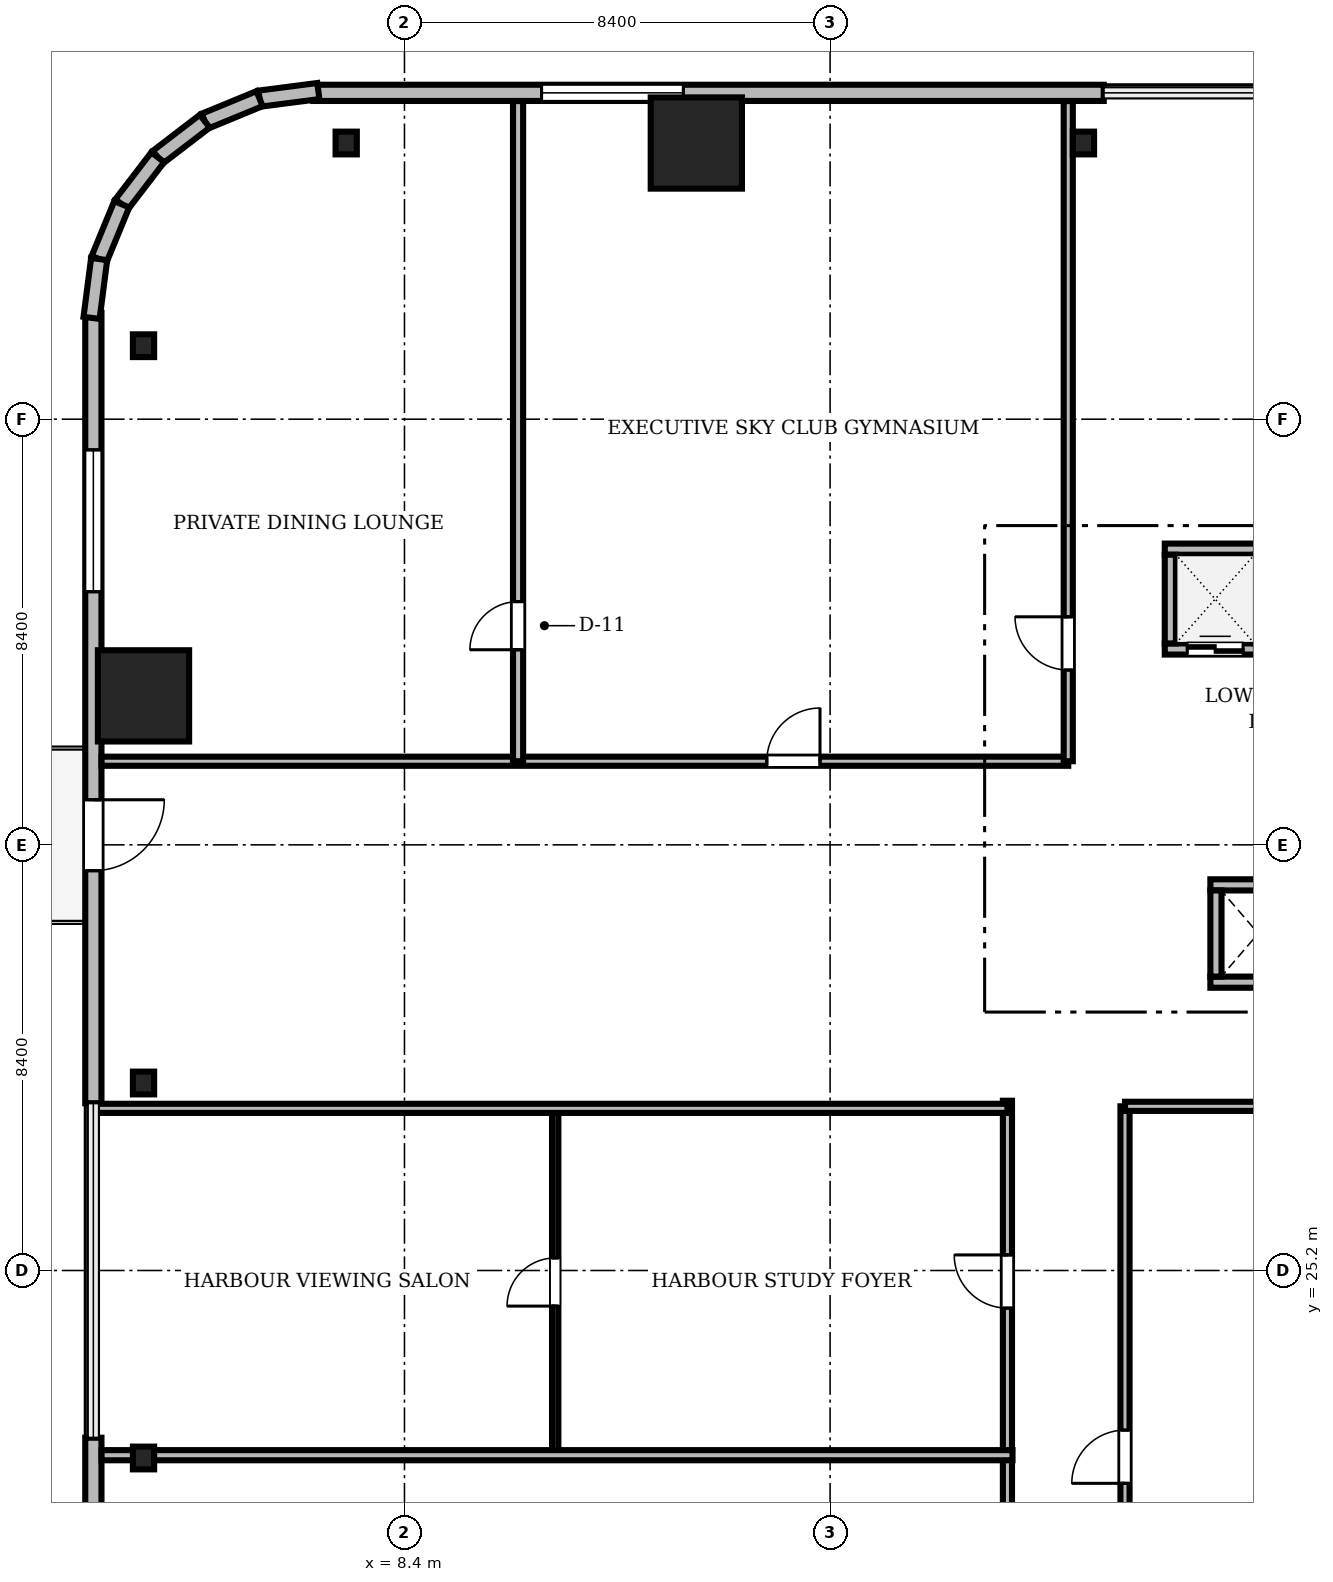
"""IFC4 building model, lengths in metres.
Left out: names, types, materials, properties, quantities, classifications, styles, units other than length and angle.
Written with IfcOpenShell. Run it as: python <this file> out.ifc"""

import sys

from ifc_helpers import new_model, si_unit, direction, frame, frame_2d, origin, origin_2d, place, context, subcontext, project, spatial, rectangle, i_section, extrude, source, transform, mapped, element, fill, save


model = new_model("IFC4")
c1 = context("Model", 3, precision=1e-05, world=origin(), true_north=direction((0.0, 1.0)))
c2 = subcontext(c1, "Body", "Model", "MODEL_VIEW")
j1 = project(units=[si_unit("LENGTHUNIT", "METRE"), si_unit("PLANEANGLEUNIT", "RADIAN")], contexts=[c1])
p1 = place(None, origin())
s1 = spatial("IfcSite", under=j1, at=p1, CompositionType="ELEMENT")
p2 = place(p1, origin())
s2 = spatial("IfcBuilding", under=s1, at=p2, CompositionType="ELEMENT")
p3 = place(p2, frame((0.0, 0.0, 71.4)))
s3 = spatial("IfcBuildingStorey", under=s2, at=p3, CompositionType="ELEMENT", Elevation=71.4)
m1 = source(origin(), c2, "Body", "SweptSolid", [
    extrude(rectangle(XDim=1.8, YDim=1.8, at=origin_2d()), origin(), (0.0, 0.0, 1.0), 3.41),
])
for number, where, z_axis, x_axis in (
    (1, (14.16, 47.45, 0.0), (0.0, 0.0, 1.0), (1.0, 0.0, 0.0)),
    (2, (3.25, 36.54, 0.0), (0.0, 0.0, 1.0), (1.0, 0.0, 0.0)),
):
    element("IfcColumn", number, at=place(p3, frame(where, z_axis=z_axis, x_axis=x_axis)), inside=s3, PredefinedType="COLUMN", context=c2, shape_type="MappedRepresentation", body=[
        mapped(m1, transform((0.0, 0.0, 0.0), scale=1.0)),
    ])
m2 = source(origin(), c2, "Body", "SweptSolid", [
    extrude(i_section(OverallWidth=0.419, OverallDepth=0.449, WebThickness=0.031, FlangeThickness=0.048, FilletRadius=0.015, at=origin_2d()), origin(), (0.0, 0.0, 1.0), 3.41),
])
for number, where, z_axis, x_axis in (
    (3, (21.8, 47.45, 0.0), (0.0, 0.0, 1.0), (1.0, 0.0, 0.0)),
    (4, (7.25, 47.45, 0.0), (0.0, 0.0, 1.0), (1.0, 0.0, 0.0)),
    (5, (3.25, 43.45, 0.0), (0.0, 0.0, 1.0), (1.0, 0.0, 0.0)),
    (6, (3.25, 28.9, 0.0), (0.0, 0.0, 1.0), (1.0, 0.0, 0.0)),
    (7, (3.25, 21.5, 0.0), (0.0, 0.0, 1.0), (1.0, 0.0, 0.0)),
):
    element("IfcColumn", number, at=place(p3, frame(where, z_axis=z_axis, x_axis=x_axis)), inside=s3, PredefinedType="COLUMN", context=c2, shape_type="MappedRepresentation", body=[
        mapped(m2, transform((0.0, 0.0, 0.0), scale=1.0)),
    ])
m3 = source(origin(), c2, "Body", "SweptSolid", [
    extrude(rectangle(XDim=15.6, YDim=0.32, at=frame_2d((7.8, 0.0))), origin(), (0.0, 0.0, 1.0), 3.41),
])
p4 = place(p3, frame((22.2, 48.44, 0.0), z_axis=(0.0, 0.0, 1.0), x_axis=(-1.0, 0.0, 0.0)))
e8 = element("IfcWall", 8, at=p4, inside=s3, PredefinedType="SOLIDWALL", context=c2, shape_type="MappedRepresentation", body=[
    mapped(m3, transform((0.0, 0.0, 0.0), scale=1.0)),
])
m4 = source(origin(), c2, "Body", "SweptSolid", [
    extrude(rectangle(XDim=2.8, YDim=2.4, at=frame_2d((1.4, 1.2))), frame((0.0, 0.17, 0.0), z_axis=(0.0, -1.0, 0.0), x_axis=(1.0, 0.0, 0.0)), (0.0, 0.0, 1.0), 0.34),
])
p5 = place(p4, frame((8.295, 0.0, 0.72)))
e9 = element("IfcOpeningElement", 9, at=p5, cuts=e8, PredefinedType="OPENING", context=c2, shape_type="MappedRepresentation", body=[
    mapped(m4, transform((0.0, 0.0, 0.0), scale=1.0)),
])
m5 = source(origin(), c2, "Body", "SweptSolid", [
    extrude(rectangle(XDim=15.6, YDim=0.32, at=frame_2d((7.8, 0.0))), origin(), (0.0, 0.0, 1.0), 3.41),
])
p6 = place(p3, frame((2.26, 44.1, 0.0), z_axis=(0.0, 0.0, 1.0), x_axis=(0.0, -1.0, 0.0)))
e10 = element("IfcWall", 10, at=p6, inside=s3, PredefinedType="SOLIDWALL", context=c2, shape_type="MappedRepresentation", body=[
    mapped(m5, transform((0.0, 0.0, 0.0), scale=1.0)),
])
m6 = source(origin(), c2, "Body", "SweptSolid", [
    extrude(rectangle(XDim=1.4, YDim=2.3, at=frame_2d((0.7, 1.15))), frame((0.0, 0.17, 0.0), z_axis=(0.0, -1.0, 0.0), x_axis=(1.0, 0.0, 0.0)), (0.0, 0.0, 1.0), 0.34),
])
p7 = place(p6, frame((9.61, 0.0, 0.0)))
e11 = element("IfcOpeningElement", 11, at=p7, cuts=e10, PredefinedType="OPENING", context=c2, shape_type="MappedRepresentation", body=[
    mapped(m6, transform((0.0, 0.0, 0.0), scale=1.0)),
])
p8 = place(p6, frame((2.705, 0.0, 0.72)))
e12 = element("IfcOpeningElement", 12, at=p8, cuts=e10, PredefinedType="OPENING", context=c2, shape_type="MappedRepresentation", body=[
    mapped(m4, transform((0.0, 0.0, 0.0), scale=1.0)),
])
p9 = place(p3, frame((2.26, 21.9, 0.0), z_axis=(0.0, 0.0, 1.0), x_axis=(0.0, -1.0, 0.0)))
e13 = element("IfcWall", 13, at=p9, inside=s3, PredefinedType="SOLIDWALL", context=c2, shape_type="MappedRepresentation", body=[
    mapped(m3, transform((0.0, 0.0, 0.0), scale=1.0)),
])
p10 = place(p9, frame((10.095, 0.0, 0.72)))
e14 = element("IfcOpeningElement", 14, at=p10, cuts=e13, PredefinedType="OPENING", context=c2, shape_type="MappedRepresentation", body=[
    mapped(m4, transform((0.0, 0.0, 0.0), scale=1.0)),
])
m7 = source(origin(), c2, "Body", "SweptSolid", [
    extrude(rectangle(XDim=1.17, YDim=0.32, at=frame_2d((0.585, 0.0))), origin(), (0.0, 0.0, 1.0), 3.41),
])
p11 = place(p3, frame((6.7, 48.476, 0.0), z_axis=(0.0, 0.0, 1.0), x_axis=(-0.991735963317, -0.128295670475, 0.0)))
e15 = element("IfcWall", 15, at=p11, inside=s3, PredefinedType="SOLIDWALL", context=c2, shape_type="MappedRepresentation", body=[
    mapped(m7, transform((0.0, 0.0, 0.0), scale=1.0)),
])
m8 = source(origin(), c2, "Body", "SweptSolid", [
    extrude(rectangle(XDim=1.169, YDim=0.32, at=frame_2d((0.584, 0.0))), origin(), (0.0, 0.0, 1.0), 3.41),
])
p12 = place(p3, frame((5.54, 48.325, 0.0), z_axis=(0.0, 0.0, 1.0), x_axis=(-0.924552646638, -0.381054331552, 0.0)))
e16 = element("IfcWall", 16, at=p12, inside=s3, PredefinedType="SOLIDWALL", context=c2, shape_type="MappedRepresentation", body=[
    mapped(m8, transform((0.0, 0.0, 0.0), scale=1.0)),
])
m9 = source(origin(), c2, "Body", "SweptSolid", [
    extrude(rectangle(XDim=1.169, YDim=0.32, at=frame_2d((0.584, 0.0))), origin(), (0.0, 0.0, 1.0), 3.41),
])
p13 = place(p3, frame((4.459, 47.88, 0.0), z_axis=(0.0, 0.0, 1.0), x_axis=(-0.793663520347, -0.608356981114, 0.0)))
e17 = element("IfcWall", 17, at=p13, inside=s3, PredefinedType="SOLIDWALL", context=c2, shape_type="MappedRepresentation", body=[
    mapped(m9, transform((0.0, 0.0, 0.0), scale=1.0)),
])
m10 = source(origin(), c2, "Body", "SweptSolid", [
    extrude(rectangle(XDim=1.169, YDim=0.32, at=frame_2d((0.584, 0.0))), origin(), (0.0, 0.0, 1.0), 3.41),
])
p14 = place(p3, frame((3.531, 47.169, 0.0), z_axis=(0.0, 0.0, 1.0), x_axis=(-0.608387696831, -0.793639975269, 0.0)))
e18 = element("IfcWall", 18, at=p14, inside=s3, PredefinedType="SOLIDWALL", context=c2, shape_type="MappedRepresentation", body=[
    mapped(m10, transform((0.0, 0.0, 0.0), scale=1.0)),
])
p15 = place(p3, frame((2.82, 46.241, 0.0), z_axis=(0.0, 0.0, 1.0), x_axis=(-0.381054331552, -0.924552646638, 0.0)))
e19 = element("IfcWall", 19, at=p15, inside=s3, PredefinedType="SOLIDWALL", context=c2, shape_type="MappedRepresentation", body=[
    mapped(m8, transform((0.0, 0.0, 0.0), scale=1.0)),
])
p16 = place(p3, frame((2.375, 45.16, 0.0), z_axis=(0.0, 0.0, 1.0), x_axis=(-0.128295670475, -0.991735963317, 0.0)))
e20 = element("IfcWall", 20, at=p16, inside=s3, PredefinedType="SOLIDWALL", context=c2, shape_type="MappedRepresentation", body=[
    mapped(m7, transform((0.0, 0.0, 0.0), scale=1.0)),
])
m11 = source(origin(), c2, "Body", "SweptSolid", [
    extrude(rectangle(XDim=1.99, YDim=0.22, at=frame_2d((0.995, 0.0))), origin(), (0.0, 0.0, 1.0), 3.41),
])
p17 = place(p3, frame((23.405, 37.465, 0.0), z_axis=(0.0, 0.0, 1.0), x_axis=(1.0, 0.0, 0.0)))
e21 = element("IfcWall", 21, at=p17, inside=s3, PredefinedType="SOLIDWALL", context=c2, shape_type="MappedRepresentation", body=[
    mapped(m11, transform((0.0, 0.0, 0.0), scale=1.0)),
])
m12 = source(origin(), c2, "Body", "SweptSolid", [
    extrude(rectangle(XDim=1.1, YDim=2.2, at=frame_2d((0.55, 1.1))), frame((0.0, 0.12, 0.0), z_axis=(0.0, -1.0, 0.0), x_axis=(1.0, 0.0, 0.0)), (0.0, 0.0, 1.0), 0.24),
])
p18 = place(p17, frame((0.445, 0.0, 0.0)))
e22 = element("IfcOpeningElement", 22, at=p18, cuts=e21, PredefinedType="OPENING", context=c2, shape_type="MappedRepresentation", body=[
    mapped(m12, transform((0.0, 0.0, 0.0), scale=1.0)),
])
p19 = place(p3, frame((23.405, 39.435, 0.0), z_axis=(0.0, 0.0, 1.0), x_axis=(1.0, 0.0, 0.0)))
e23 = element("IfcWall", 23, at=p19, inside=s3, PredefinedType="SOLIDWALL", context=c2, shape_type="MappedRepresentation", body=[
    mapped(m11, transform((0.0, 0.0, 0.0), scale=1.0)),
])
m13 = source(origin(), c2, "Body", "SweptSolid", [
    extrude(rectangle(XDim=1.75, YDim=0.22, at=frame_2d((0.875, 0.0))), origin(), (0.0, 0.0, 1.0), 3.41),
])
p20 = place(p3, frame((23.515, 37.575, 0.0), z_axis=(0.0, 0.0, 1.0), x_axis=(0.0, 1.0, 0.0)))
e24 = element("IfcWall", 24, at=p20, inside=s3, PredefinedType="SOLIDWALL", context=c2, shape_type="MappedRepresentation", body=[
    mapped(m13, transform((0.0, 0.0, 0.0), scale=1.0)),
])
m14 = source(origin(), c2, "Body", "SweptSolid", [
    extrude(rectangle(XDim=1.89, YDim=0.22, at=frame_2d((0.945, 0.0))), origin(), (0.0, 0.0, 1.0), 3.41),
])
for number, where, z_axis, x_axis in (
    (25, (24.305, 30.89, 0.0), (0.0, 0.0, 1.0), (1.0, 0.0, 0.0)),
    (26, (24.305, 32.81, 0.0), (0.0, 0.0, 1.0), (1.0, 0.0, 0.0)),
):
    element("IfcWall", number, at=place(p3, frame(where, z_axis=z_axis, x_axis=x_axis)), inside=s3, PredefinedType="SOLIDWALL", context=c2, shape_type="MappedRepresentation", body=[
        mapped(m14, transform((0.0, 0.0, 0.0), scale=1.0)),
    ])
m15 = source(origin(), c2, "Body", "SweptSolid", [
    extrude(rectangle(XDim=1.7, YDim=0.22, at=frame_2d((0.85, 0.0))), origin(), (0.0, 0.0, 1.0), 3.41),
])
p21 = place(p3, frame((24.415, 31.0, 0.0), z_axis=(0.0, 0.0, 1.0), x_axis=(0.0, 1.0, 0.0)))
e27 = element("IfcWall", 27, at=p21, inside=s3, PredefinedType="SOLIDWALL", context=c2, shape_type="MappedRepresentation", body=[
    mapped(m15, transform((0.0, 0.0, 0.0), scale=1.0)),
])
m16 = source(origin(), c2, "Body", "SweptSolid", [
    extrude(rectangle(XDim=19.078, YDim=0.18, at=frame_2d((9.539, 0.0))), origin(), (0.0, 0.0, 1.0), 2.652),
])
p22 = place(p3, frame((2.422, 35.25, 0.0), z_axis=(0.0, 0.0, 1.0), x_axis=(1.0, 0.0, 0.0)))
e28 = element("IfcWall", 28, at=p22, inside=s3, PredefinedType="PARTITIONING", context=c2, shape_type="MappedRepresentation", body=[
    mapped(m16, transform((0.0, 0.0, 0.0), scale=1.0)),
])
m17 = source(origin(), c2, "Body", "SweptSolid", [
    extrude(rectangle(XDim=1.05, YDim=2.2, at=frame_2d((0.525, 1.1))), frame((0.0, 0.1, 0.0), z_axis=(0.0, -1.0, 0.0), x_axis=(1.0, 0.0, 0.0)), (0.0, 0.0, 1.0), 0.2),
])
p23 = place(p22, frame((13.129, 0.0, 0.0)))
e29 = element("IfcOpeningElement", 29, at=p23, cuts=e28, PredefinedType="OPENING", context=c2, shape_type="MappedRepresentation", body=[
    mapped(m17, transform((0.0, 0.0, 0.0), scale=1.0)),
])
m18 = source(origin(), c2, "Body", "SweptSolid", [
    extrude(rectangle(XDim=13.84, YDim=0.18, at=frame_2d((6.92, 0.0))), origin(), (0.0, 0.0, 1.0), 2.802),
])
p24 = place(p3, frame((20.3, 14.71, 0.0), z_axis=(0.0, 0.0, 1.0), x_axis=(0.0, 1.0, 0.0)))
e30 = element("IfcWall", 30, at=p24, inside=s3, PredefinedType="PARTITIONING", context=c2, shape_type="MappedRepresentation", body=[
    mapped(m18, transform((0.0, 0.0, 0.0), scale=1.0)),
])
p25 = place(p24, frame((2.903, 0.0, 0.0)))
e31 = element("IfcOpeningElement", 31, at=p25, cuts=e30, PredefinedType="OPENING", context=c2, shape_type="MappedRepresentation", body=[
    mapped(m17, transform((0.0, 0.0, 0.0), scale=1.0)),
])
p26 = place(p24, frame((9.748, 0.0, 0.0)))
e32 = element("IfcOpeningElement", 32, at=p26, cuts=e30, PredefinedType="OPENING", context=c2, shape_type="MappedRepresentation", body=[
    mapped(m17, transform((0.0, 0.0, 0.0), scale=1.0)),
])
m19 = source(origin(), c2, "Body", "SweptSolid", [
    extrude(rectangle(XDim=13.028, YDim=0.2, at=frame_2d((6.514, 0.0))), origin(), (0.0, 0.0, 1.0), 2.652),
])
p27 = place(p3, frame((10.642, 35.25, 0.0), z_axis=(0.0, 0.0, 1.0), x_axis=(0.0, 1.0, 0.0)))
e33 = element("IfcWall", 33, at=p27, inside=s3, PredefinedType="PARTITIONING", context=c2, shape_type="MappedRepresentation", body=[
    mapped(m19, transform((0.0, 0.0, 0.0), scale=1.0)),
])
m20 = source(origin(), c2, "Body", "SweptSolid", [
    extrude(rectangle(XDim=0.95, YDim=2.15, at=frame_2d((0.475, 1.075))), frame((0.0, 0.11, 0.0), z_axis=(0.0, -1.0, 0.0), x_axis=(1.0, 0.0, 0.0)), (0.0, 0.0, 1.0), 0.22),
])
p28 = place(p27, frame((2.2, 0.0, 0.0)))
e34 = element("IfcOpeningElement", 34, at=p28, cuts=e33, PredefinedType="OPENING", context=c2, shape_type="MappedRepresentation", body=[
    mapped(m20, transform((0.0, 0.0, 0.0), scale=1.0)),
])
m21 = source(origin(), c2, "Body", "SweptSolid", [
    extrude(rectangle(XDim=13.028, YDim=0.18, at=frame_2d((6.514, 0.0))), origin(), (0.0, 0.0, 1.0), 2.652),
])
p29 = place(p3, frame((21.5, 35.25, 0.0), z_axis=(0.0, 0.0, 1.0), x_axis=(0.0, 1.0, 0.0)))
e35 = element("IfcWall", 35, at=p29, inside=s3, PredefinedType="PARTITIONING", context=c2, shape_type="MappedRepresentation", body=[
    mapped(m21, transform((0.0, 0.0, 0.0), scale=1.0)),
])
p30 = place(p29, frame((1.8, 0.0, 0.0)))
e36 = element("IfcOpeningElement", 36, at=p30, cuts=e35, PredefinedType="OPENING", context=c2, shape_type="MappedRepresentation", body=[
    mapped(m17, transform((0.0, 0.0, 0.0), scale=1.0)),
])
m22 = source(origin(), c2, "Body", "SweptSolid", [
    extrude(rectangle(XDim=11.94, YDim=0.18, at=frame_2d((5.97, 0.0))), origin(), (0.0, 0.0, 1.0), 2.802),
])
p31 = place(p3, frame((22.62, 16.5, 0.0), z_axis=(0.0, 0.0, 1.0), x_axis=(0.0, 1.0, 0.0)))
e37 = element("IfcWall", 37, at=p31, inside=s3, PredefinedType="PARTITIONING", context=c2, shape_type="MappedRepresentation", body=[
    mapped(m22, transform((0.0, 0.0, 0.0), scale=1.0)),
])
p32 = place(p31, frame((4.5, 0.0, 0.0)))
e38 = element("IfcOpeningElement", 38, at=p32, cuts=e37, PredefinedType="OPENING", context=c2, shape_type="MappedRepresentation", body=[
    mapped(m17, transform((0.0, 0.0, 0.0), scale=1.0)),
])
m23 = source(origin(), c2, "Body", "SweptSolid", [
    extrude(rectangle(XDim=6.845, YDim=0.125, at=frame_2d((3.422, 0.0))), origin(), (0.0, 0.0, 1.0), 2.802),
])
p33 = place(p3, frame((11.375, 21.555, 0.0), z_axis=(0.0, 0.0, 1.0), x_axis=(0.0, 1.0, 0.0)))
e39 = element("IfcWall", 39, at=p33, inside=s3, PredefinedType="PARTITIONING", context=c2, shape_type="MappedRepresentation", body=[
    mapped(m23, transform((0.0, 0.0, 0.0), scale=1.0)),
])
m24 = source(origin(), c2, "Body", "SweptSolid", [
    extrude(rectangle(XDim=0.95, YDim=2.15, at=frame_2d((0.475, 1.075))), frame((0.0, 0.073, 0.0), z_axis=(0.0, -1.0, 0.0), x_axis=(1.0, 0.0, 0.0)), (0.0, 0.0, 1.0), 0.145),
])
p34 = place(p33, frame((2.942, 0.0, 0.0)))
e40 = element("IfcOpeningElement", 40, at=p34, cuts=e39, PredefinedType="OPENING", context=c2, shape_type="MappedRepresentation", body=[
    mapped(m24, transform((0.0, 0.0, 0.0), scale=1.0)),
])
m25 = source(origin(), c2, "Body", "SweptSolid", [
    extrude(rectangle(XDim=17.978, YDim=0.2, at=frame_2d((8.989, 0.0))), origin(), (0.0, 0.0, 1.0), 2.652),
])
p35 = place(p3, frame((2.422, 21.555, 0.0), z_axis=(0.0, 0.0, 1.0), x_axis=(1.0, 0.0, 0.0)))
e41 = element("IfcWall", 41, at=p35, inside=s3, PredefinedType="PARTITIONING", context=c2, shape_type="MappedRepresentation", body=[
    mapped(m25, transform((0.0, 0.0, 0.0), scale=1.0)),
])
m26 = source(origin(), c2, "Body", "SweptSolid", [
    extrude(rectangle(XDim=18.07, YDim=0.18, at=frame_2d((9.035, 0.0))), origin(), (0.0, 0.0, 1.0), 2.652),
])
p36 = place(p3, frame((2.23, 28.4, 0.0), z_axis=(0.0, 0.0, 1.0), x_axis=(1.0, 0.0, 0.0)))
e42 = element("IfcWall", 42, at=p36, inside=s3, PredefinedType="PARTITIONING", context=c2, shape_type="MappedRepresentation", body=[
    mapped(m26, transform((0.0, 0.0, 0.0), scale=1.0)),
])
m27 = source(origin(), c2, "Body", "SweptSolid", [
    extrude(rectangle(XDim=5.78, YDim=0.18, at=frame_2d((2.89, 0.0))), origin(), (0.0, 0.0, 1.0), 3.41),
])
p37 = place(p3, frame((22.62, 28.44, 0.0), z_axis=(0.0, 0.0, 1.0), x_axis=(1.0, 0.0, 0.0)))
e43 = element("IfcWall", 43, at=p37, inside=s3, PredefinedType="PARTITIONING", context=c2, shape_type="MappedRepresentation", body=[
    mapped(m27, transform((0.0, 0.0, 0.0), scale=1.0)),
])
m28 = source(origin(), c2, "Body", "SweptSolid", [
    extrude(rectangle(XDim=2.8, YDim=2.4, at=frame_2d((1.4, 1.2))), frame((0.0, 0.03, 0.0), z_axis=(0.0, -1.0, 0.0), x_axis=(1.0, 0.0, 0.0)), (0.0, 0.0, 1.0), 0.06),
])
p38 = place(p5, origin())
e44 = element("IfcWindow", 44, at=p38, inside=s3, PartitioningType="SINGLE_PANEL", PredefinedType="WINDOW", context=c2, shape_type="MappedRepresentation", body=[
    mapped(m28, transform((0.0, 0.0, 0.0), scale=1.0)),
])
fill(e9, e44)
m29 = source(origin(), c2, "Body", "SweptSolid", [
    extrude(rectangle(XDim=1.4, YDim=2.3, at=frame_2d((0.7, 1.15))), frame((0.0, 0.025, 0.0), z_axis=(0.0, -1.0, 0.0), x_axis=(1.0, 0.0, 0.0)), (0.0, 0.0, 1.0), 0.05),
])
p39 = place(p7, frame((1.4, 0.0, 0.0), z_axis=(0.0, 0.0, 1.0), x_axis=(-1.0, 0.0, 0.0)))
e45 = element("IfcDoor", 45, at=p39, inside=s3, OperationType="DOUBLE_DOOR_SLIDING", PredefinedType="DOOR", context=c2, shape_type="MappedRepresentation", body=[
    mapped(m29, transform((0.0, 0.0, 0.0), scale=1.0)),
])
fill(e11, e45)
p40 = place(p8, origin())
e46 = element("IfcWindow", 46, at=p40, inside=s3, PartitioningType="SINGLE_PANEL", PredefinedType="WINDOW", context=c2, shape_type="MappedRepresentation", body=[
    mapped(m28, transform((0.0, 0.0, 0.0), scale=1.0)),
])
fill(e12, e46)
m30 = source(origin(), c2, "Body", "SweptSolid", [
    extrude(rectangle(XDim=1.1, YDim=2.2, at=frame_2d((0.55, 1.1))), frame((0.0, 0.025, 0.0), z_axis=(0.0, -1.0, 0.0), x_axis=(1.0, 0.0, 0.0)), (0.0, 0.0, 1.0), 0.05),
])
p41 = place(p18, origin())
e47 = element("IfcDoor", 47, at=p41, inside=s3, OperationType="DOUBLE_DOOR_SLIDING", PredefinedType="DOOR", context=c2, shape_type="MappedRepresentation", body=[
    mapped(m30, transform((0.0, 0.0, 0.0), scale=1.0)),
])
fill(e22, e47)
m31 = source(origin(), c2, "Body", "SweptSolid", [
    extrude(rectangle(XDim=1.05, YDim=2.2, at=frame_2d((0.525, 1.1))), frame((0.0, 0.025, 0.0), z_axis=(0.0, -1.0, 0.0), x_axis=(1.0, 0.0, 0.0)), (0.0, 0.0, 1.0), 0.05),
])
p42 = place(p23, origin())
e48 = element("IfcDoor", 48, at=p42, inside=s3, OperationType="SINGLE_SWING_RIGHT", PredefinedType="DOOR", context=c2, shape_type="MappedRepresentation", body=[
    mapped(m31, transform((0.0, 0.0, 0.0), scale=1.0)),
])
fill(e29, e48)
p43 = place(p26, origin())
e49 = element("IfcDoor", 49, at=p43, inside=s3, OperationType="SINGLE_SWING_RIGHT", PredefinedType="DOOR", context=c2, shape_type="MappedRepresentation", body=[
    mapped(m31, transform((0.0, 0.0, 0.0), scale=1.0)),
])
fill(e32, e49)
m32 = source(origin(), c2, "Body", "SweptSolid", [
    extrude(rectangle(XDim=0.95, YDim=2.15, at=frame_2d((0.475, 1.075))), frame((0.0, 0.025, 0.0), z_axis=(0.0, -1.0, 0.0), x_axis=(1.0, 0.0, 0.0)), (0.0, 0.0, 1.0), 0.05),
])
p44 = place(p28, origin())
e50 = element("IfcDoor", 50, at=p44, inside=s3, OperationType="SINGLE_SWING_LEFT", PredefinedType="DOOR", context=c2, shape_type="MappedRepresentation", body=[
    mapped(m32, transform((0.0, 0.0, 0.0), scale=1.0)),
])
fill(e34, e50)
p45 = place(p30, origin())
e51 = element("IfcDoor", 51, at=p45, inside=s3, OperationType="SINGLE_SWING_RIGHT", PredefinedType="DOOR", context=c2, shape_type="MappedRepresentation", body=[
    mapped(m31, transform((0.0, 0.0, 0.0), scale=1.0)),
])
fill(e36, e51)
p46 = place(p32, origin())
e52 = element("IfcDoor", 52, at=p46, inside=s3, OperationType="SINGLE_SWING_LEFT", PredefinedType="DOOR", context=c2, shape_type="MappedRepresentation", body=[
    mapped(m31, transform((0.0, 0.0, 0.0), scale=1.0)),
])
fill(e38, e52)
p47 = place(p34, origin())
e53 = element("IfcDoor", 53, at=p47, inside=s3, OperationType="SINGLE_SWING_LEFT", PredefinedType="DOOR", context=c2, shape_type="MappedRepresentation", body=[
    mapped(m32, transform((0.0, 0.0, 0.0), scale=1.0)),
])
fill(e40, e53)
save(model, sys.argv[1])
